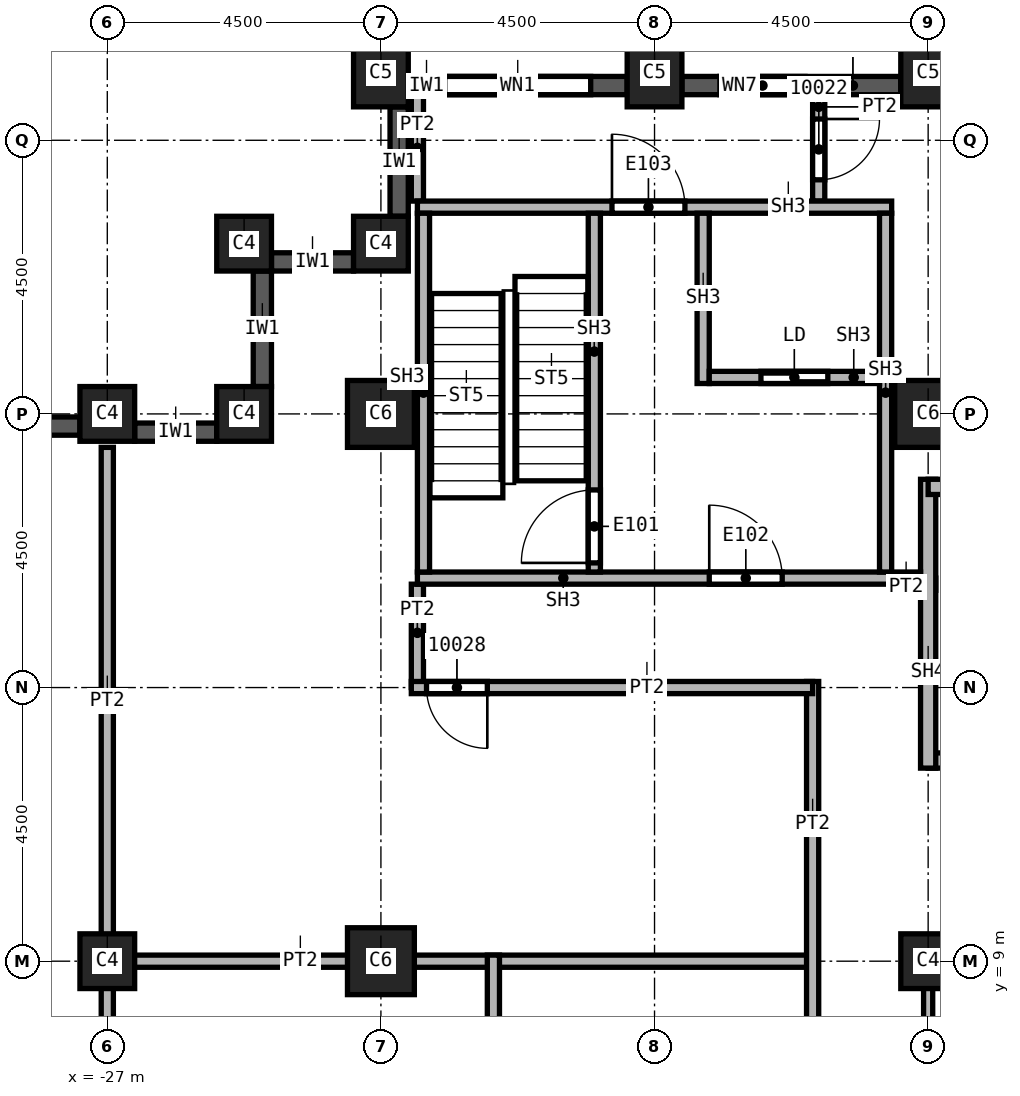
"""IFC4 building model, lengths in metres.
Left out: names, types, materials, properties, quantities, classifications, styles, units other than length and angle.
Written with IfcOpenShell. Run it as: python <this file> out.ifc"""

import sys

from ifc_helpers import new_model, si_unit, direction, frame, frame_2d, origin, origin_2d, place, context, subcontext, project, spatial, rectangle, extrude, element, fill, save


model = new_model("IFC4")
c1 = context("Model", 3, precision=1e-05, world=origin(), true_north=direction((0.0, 1.0)))
c2 = subcontext(c1, "Body", "Model", "MODEL_VIEW")
j1 = project(units=[si_unit("LENGTHUNIT", "METRE"), si_unit("PLANEANGLEUNIT", "RADIAN")], contexts=[c1])
p1 = place(None, origin())
s1 = spatial("IfcSite", under=j1, at=p1, CompositionType="ELEMENT")
p2 = place(p1, origin())
s2 = spatial("IfcBuilding", under=s1, at=p2, CompositionType="ELEMENT")
p3 = place(p2, frame((0.0, 0.0, 174.0)))
s3 = spatial("IfcBuildingStorey", under=s2, at=p3, CompositionType="ELEMENT", Elevation=174.0)
for number, where, z_axis, x_axis in (
    (1, (-13.5, 18.0, 0.0), (0.0, 0.0, 1.0), (1.0, 0.0, 0.0)),
    (2, (-22.5, 9.0, 0.0), (0.0, 0.0, 1.0), (1.0, 0.0, 0.0)),
    (3, (-22.5, 18.0, 0.0), (0.0, 0.0, 1.0), (1.0, 0.0, 0.0)),
):
    element("IfcColumn", number, at=place(p3, frame(where, z_axis=z_axis, x_axis=x_axis)), inside=s3, PredefinedType="COLUMN", context=c2, shape_type="SweptSolid", body=[
        extrude(rectangle(XDim=1.1, YDim=1.1, at=origin_2d()), origin(), (0.0, 0.0, 1.0), 3.59),
    ])
p4 = place(p3, frame((-13.5, 9.0, 0.0), z_axis=(0.0, 0.0, 1.0), x_axis=(1.0, 0.0, 0.0)))
e4 = element("IfcColumn", 4, at=p4, inside=s3, PredefinedType="COLUMN", context=c2, shape_type="SweptSolid", body=[
    extrude(rectangle(XDim=0.9, YDim=0.9, at=origin_2d()), origin(), (0.0, 0.0, 1.0), 3.59),
])
for number, where, z_axis, x_axis in (
    (5, (-13.5, 23.6, 0.0), (0.0, 0.0, 1.0), (1.0, 0.0, 0.0)),
    (6, (-18.0, 23.6, 0.0), (0.0, 0.0, 1.0), (1.0, 0.0, 0.0)),
    (7, (-22.5, 23.6, 0.0), (0.0, 0.0, 1.0), (1.0, 0.0, 0.0)),
):
    element("IfcColumn", number, at=place(p3, frame(where, z_axis=z_axis, x_axis=x_axis)), inside=s3, PredefinedType="COLUMN", context=c2, shape_type="SweptSolid", body=[
        extrude(rectangle(XDim=0.9, YDim=1.1, at=origin_2d()), origin(), (0.0, 0.0, 1.0), 3.59),
    ])
for number, where, z_axis, x_axis in (
    (8, (-27.0, 9.0, 0.0), (0.0, 0.0, 1.0), (1.0, 0.0, 0.0)),
    (9, (-27.0, 18.0, 0.0), (0.0, 0.0, 1.0), (1.0, 0.0, 0.0)),
    (10, (-22.5, 20.8, 0.0), (0.0, 0.0, 1.0), (1.0, 0.0, 0.0)),
    (11, (-24.75, 20.8, 0.0), (0.0, 0.0, 1.0), (1.0, 0.0, 0.0)),
    (12, (-24.75, 18.0, 0.0), (0.0, 0.0, 1.0), (1.0, 0.0, 0.0)),
):
    element("IfcColumn", number, at=place(p3, frame(where, z_axis=z_axis, x_axis=x_axis)), inside=s3, PredefinedType="COLUMN", context=c2, shape_type="SweptSolid", body=[
        extrude(rectangle(XDim=0.9, YDim=0.9, at=origin_2d()), origin(), (0.0, 0.0, 1.0), 3.59),
    ])
p5 = place(p3, frame((-22.2, 23.05, 0.0), z_axis=(0.0, 0.0, 1.0), x_axis=(0.0, -1.0, 0.0)))
e13 = element("IfcWall", 13, at=p5, inside=s3, PredefinedType="SOLIDWALL", context=c2, shape_type="SweptSolid", body=[
    extrude(rectangle(XDim=1.8, YDim=0.3, at=frame_2d((0.9, 0.0))), origin(), (0.0, 0.0, 1.0), 2.99),
])
p6 = place(p3, frame((-22.95, 20.5, 0.0), z_axis=(0.0, 0.0, 1.0), x_axis=(-1.0, 0.0, 0.0)))
e14 = element("IfcWall", 14, at=p6, inside=s3, PredefinedType="SOLIDWALL", context=c2, shape_type="SweptSolid", body=[
    extrude(rectangle(XDim=1.35, YDim=0.3, at=frame_2d((0.675, 0.0))), origin(), (0.0, 0.0, 1.0), 2.99),
])
p7 = place(p3, frame((-24.45, 20.35, 0.0), z_axis=(0.0, 0.0, 1.0), x_axis=(0.0, -1.0, 0.0)))
e15 = element("IfcWall", 15, at=p7, inside=s3, PredefinedType="SOLIDWALL", context=c2, shape_type="SweptSolid", body=[
    extrude(rectangle(XDim=1.9, YDim=0.3, at=frame_2d((0.95, 0.0))), origin(), (0.0, 0.0, 1.0), 2.99),
])
p8 = place(p3, frame((-25.2, 17.7, 0.0), z_axis=(0.0, 0.0, 1.0), x_axis=(-1.0, 0.0, 0.0)))
e16 = element("IfcWall", 16, at=p8, inside=s3, PredefinedType="SOLIDWALL", context=c2, shape_type="SweptSolid", body=[
    extrude(rectangle(XDim=1.35, YDim=0.3, at=frame_2d((0.675, 0.0))), origin(), (0.0, 0.0, 1.0), 2.99),
])
p9 = place(p3, frame((-27.45, 17.8, 0.0), z_axis=(0.0, 0.0, 1.0), x_axis=(-1.0, 0.0, 0.0)))
e17 = element("IfcWall", 17, at=p9, inside=s3, PredefinedType="SOLIDWALL", context=c2, shape_type="SweptSolid", body=[
    extrude(rectangle(XDim=3.6, YDim=0.3, at=frame_2d((1.8, 0.0))), origin(), (0.0, 0.0, 1.0), 2.99),
])
p10 = place(p9, frame((0.6, 0.0, 0.8)))
e18 = element("IfcOpeningElement", 18, at=p10, cuts=e17, PredefinedType="OPENING", context=c2, shape_type="SweptSolid", body=[
    extrude(rectangle(XDim=2.4, YDim=1.95, at=frame_2d((1.2, 0.975))), frame((0.0, 0.15, 0.0), z_axis=(0.0, -1.0, 0.0), x_axis=(1.0, 0.0, 0.0)), (0.0, 0.0, 1.0), 0.3),
])
p11 = place(p3, frame((-13.95, 23.4, 0.0), z_axis=(0.0, 0.0, 1.0), x_axis=(-1.0, 0.0, 0.0)))
e19 = element("IfcWall", 19, at=p11, inside=s3, PredefinedType="SOLIDWALL", context=c2, shape_type="SweptSolid", body=[
    extrude(rectangle(XDim=3.6, YDim=0.3, at=frame_2d((1.8, 0.0))), origin(), (0.0, 0.0, 1.0), 2.99),
])
p12 = place(p11, frame((1.575, 0.0, 0.8)))
e20 = element("IfcOpeningElement", 20, at=p12, cuts=e19, PredefinedType="OPENING", context=c2, shape_type="SweptSolid", body=[
    extrude(rectangle(XDim=1.4, YDim=1.95, at=frame_2d((0.7, 0.975))), frame((0.0, 0.15, 0.0), z_axis=(0.0, -1.0, 0.0), x_axis=(1.0, 0.0, 0.0)), (0.0, 0.0, 1.0), 0.3),
])
p13 = place(p3, frame((-18.45, 23.4, 0.0), z_axis=(0.0, 0.0, 1.0), x_axis=(-1.0, 0.0, 0.0)))
e21 = element("IfcWall", 21, at=p13, inside=s3, PredefinedType="SOLIDWALL", context=c2, shape_type="SweptSolid", body=[
    extrude(rectangle(XDim=3.6, YDim=0.3, at=frame_2d((1.8, 0.0))), origin(), (0.0, 0.0, 1.0), 2.99),
])
p14 = place(p13, frame((0.6, 0.0, 0.8)))
e22 = element("IfcOpeningElement", 22, at=p14, cuts=e21, PredefinedType="OPENING", context=c2, shape_type="SweptSolid", body=[
    extrude(rectangle(XDim=2.4, YDim=1.95, at=frame_2d((1.2, 0.975))), frame((0.0, 0.15, 0.0), z_axis=(0.0, -1.0, 0.0), x_axis=(1.0, 0.0, 0.0)), (0.0, 0.0, 1.0), 0.3),
])
p15 = place(p3, frame((-27.1, 9.0, 0.0), z_axis=(0.0, 0.0, 1.0), x_axis=(1.0, 0.0, 0.0)))
e23 = element("IfcWall", 23, at=p15, inside=s3, PredefinedType="PARTITIONING", context=c2, shape_type="SweptSolid", body=[
    extrude(rectangle(XDim=11.7, YDim=0.2, at=frame_2d((5.85, 0.0))), origin(), (0.0, 0.0, 1.0), 3.59),
])
p16 = place(p3, frame((-27.0, 3.75, 0.0), z_axis=(0.0, 0.0, 1.0), x_axis=(0.0, 1.0, 0.0)))
e24 = element("IfcWall", 24, at=p16, inside=s3, PredefinedType="PARTITIONING", context=c2, shape_type="SweptSolid", body=[
    extrude(rectangle(XDim=13.7, YDim=0.2, at=frame_2d((6.85, 0.0))), origin(), (0.0, 0.0, 1.0), 3.59),
])
p17 = place(p3, frame((-21.9, 13.5, 0.0), z_axis=(0.0, 0.0, 1.0), x_axis=(0.0, 1.0, 0.0)))
e25 = element("IfcWall", 25, at=p17, inside=s3, PredefinedType="PARTITIONING", context=c2, shape_type="SweptSolid", body=[
    extrude(rectangle(XDim=1.7, YDim=0.2, at=frame_2d((0.85, 0.0))), origin(), (0.0, 0.0, 1.0), 3.59),
])
p18 = place(p3, frame((-21.9, 21.5, 0.0), z_axis=(0.0, 0.0, 1.0), x_axis=(0.0, 1.0, 0.0)))
e26 = element("IfcWall", 26, at=p18, inside=s3, PredefinedType="PARTITIONING", context=c2, shape_type="SweptSolid", body=[
    extrude(rectangle(XDim=1.75, YDim=0.2, at=frame_2d((0.875, 0.0))), origin(), (0.0, 0.0, 1.0), 3.59),
])
p19 = place(p3, frame((-20.65, 3.75, 0.0), z_axis=(0.0, 0.0, 1.0), x_axis=(0.0, 1.0, 0.0)))
e27 = element("IfcWall", 27, at=p19, inside=s3, PredefinedType="PARTITIONING", context=c2, shape_type="SweptSolid", body=[
    extrude(rectangle(XDim=5.35, YDim=0.2, at=frame_2d((2.675, 0.0))), origin(), (0.0, 0.0, 1.0), 3.59),
])
p20 = place(p19, frame((0.25, 0.0, 0.0)))
e28 = element("IfcOpeningElement", 28, at=p20, cuts=e27, PredefinedType="OPENING", context=c2, shape_type="SweptSolid", body=[
    extrude(rectangle(XDim=1.0, YDim=2.1, at=frame_2d((0.5, 1.05))), frame((0.0, 0.1, 0.0), z_axis=(0.0, -1.0, 0.0), x_axis=(1.0, 0.0, 0.0)), (0.0, 0.0, 1.0), 0.2),
])
p21 = place(p3, frame((-15.4, 3.65, 0.0), z_axis=(0.0, 0.0, 1.0), x_axis=(0.0, 1.0, 0.0)))
e29 = element("IfcWall", 29, at=p21, inside=s3, PredefinedType="PARTITIONING", context=c2, shape_type="SweptSolid", body=[
    extrude(rectangle(XDim=9.95, YDim=0.2, at=frame_2d((4.975, 0.0))), origin(), (0.0, 0.0, 1.0), 3.59),
])
p22 = place(p21, frame((0.4, 0.0, 0.0)))
e30 = element("IfcOpeningElement", 30, at=p22, cuts=e29, PredefinedType="OPENING", context=c2, shape_type="SweptSolid", body=[
    extrude(rectangle(XDim=1.0, YDim=2.1, at=frame_2d((0.5, 1.05))), frame((0.0, 0.1, 0.0), z_axis=(0.0, -1.0, 0.0), x_axis=(1.0, 0.0, 0.0)), (0.0, 0.0, 1.0), 0.2),
])
p23 = place(p3, frame((-15.4, 13.5, 0.0), z_axis=(0.0, 0.0, 1.0), x_axis=(-1.0, 0.0, 0.0)))
e31 = element("IfcWall", 31, at=p23, inside=s3, PredefinedType="PARTITIONING", context=c2, shape_type="SweptSolid", body=[
    extrude(rectangle(XDim=6.6, YDim=0.2, at=frame_2d((3.3, 0.0))), origin(), (0.0, 0.0, 1.0), 3.59),
])
p24 = place(p23, frame((5.35, 0.0, 0.0)))
e32 = element("IfcOpeningElement", 32, at=p24, cuts=e31, PredefinedType="OPENING", context=c2, shape_type="SweptSolid", body=[
    extrude(rectangle(XDim=1.0, YDim=2.1, at=frame_2d((0.5, 1.05))), frame((0.0, 0.1, 0.0), z_axis=(0.0, -1.0, 0.0), x_axis=(1.0, 0.0, 0.0)), (0.0, 0.0, 1.0), 0.2),
])
p25 = place(p3, frame((-15.3, 23.25, 0.0), z_axis=(0.0, 0.0, 1.0), x_axis=(0.0, -1.0, 0.0)))
e33 = element("IfcWall", 33, at=p25, inside=s3, PredefinedType="PARTITIONING", context=c2, shape_type="SweptSolid", body=[
    extrude(rectangle(XDim=1.75, YDim=0.2, at=frame_2d((0.875, 0.0))), origin(), (0.0, 0.0, 1.0), 3.59),
])
p26 = place(p25, frame((0.4, 0.0, 0.0)))
e34 = element("IfcOpeningElement", 34, at=p26, cuts=e33, PredefinedType="OPENING", context=c2, shape_type="SweptSolid", body=[
    extrude(rectangle(XDim=1.0, YDim=2.1, at=frame_2d((0.5, 1.05))), frame((0.0, 0.1, 0.0), z_axis=(0.0, -1.0, 0.0), x_axis=(1.0, 0.0, 0.0)), (0.0, 0.0, 1.0), 0.2),
])
p27 = place(p3, frame((-14.1, 15.2, 0.0), z_axis=(0.0, 0.0, 1.0), x_axis=(1.0, 0.0, 0.0)))
e35 = element("IfcWall", 35, at=p27, inside=s3, PredefinedType="PARTITIONING", context=c2, shape_type="SweptSolid", body=[
    extrude(rectangle(XDim=0.725, YDim=0.2, at=frame_2d((0.363, 0.0))), origin(), (0.0, 0.0, 1.0), 3.59),
])
p28 = place(p3, frame((-13.5, 12.3, 0.0), z_axis=(0.0, 0.0, 1.0), x_axis=(1.0, 0.0, 0.0)))
e36 = element("IfcWall", 36, at=p28, inside=s3, PredefinedType="SOLIDWALL", context=c2, shape_type="SweptSolid", body=[
    extrude(rectangle(XDim=9.125, YDim=0.25, at=frame_2d((4.562, 0.0))), origin(), (0.0, 0.0, 1.0), 3.59),
])
p29 = place(p28, frame((0.6, 0.0, 0.0)))
e37 = element("IfcOpeningElement", 37, at=p29, cuts=e36, PredefinedType="OPENING", context=c2, shape_type="SweptSolid", body=[
    extrude(rectangle(XDim=1.2, YDim=2.1, at=frame_2d((0.6, 1.05))), frame((0.0, 0.125, 0.0), z_axis=(0.0, -1.0, 0.0), x_axis=(1.0, 0.0, 0.0)), (0.0, 0.0, 1.0), 0.25),
])
p30 = place(p3, frame((-13.5, 12.175, 0.0), z_axis=(0.0, 0.0, 1.0), x_axis=(0.0, 1.0, 0.0)))
e38 = element("IfcWall", 38, at=p30, inside=s3, PredefinedType="SOLIDWALL", context=c2, shape_type="SweptSolid", body=[
    extrude(rectangle(XDim=4.75, YDim=0.25, at=frame_2d((2.375, 0.0))), origin(), (0.0, 0.0, 1.0), 3.59),
])
p31 = place(p3, frame((-13.5, 16.8, 0.0), z_axis=(0.0, 0.0, 1.0), x_axis=(1.0, 0.0, 0.0)))
e39 = element("IfcWall", 39, at=p31, inside=s3, PredefinedType="SOLIDWALL", context=c2, shape_type="SweptSolid", body=[
    extrude(rectangle(XDim=9.125, YDim=0.25, at=frame_2d((4.562, 0.0))), origin(), (0.0, 0.0, 1.0), 3.59),
])
p32 = place(p3, frame((-13.5, 3.0, 0.0), z_axis=(0.0, 0.0, 1.0), x_axis=(0.0, 1.0, 0.0)))
e40 = element("IfcWall", 40, at=p32, inside=s3, PredefinedType="PARTITIONING", context=c2, shape_type="SweptSolid", body=[
    extrude(rectangle(XDim=6.075, YDim=0.15, at=frame_2d((3.038, 0.0))), origin(), (0.0, 0.0, 1.0), 2.828),
])
p33 = place(p3, frame((-13.5, 9.0, 0.0), z_axis=(0.0, 0.0, 1.0), x_axis=(1.0, 0.0, 0.0)))
e41 = element("IfcWall", 41, at=p33, inside=s3, PredefinedType="PARTITIONING", context=c2, shape_type="SweptSolid", body=[
    extrude(rectangle(XDim=3.0, YDim=0.15, at=frame_2d((1.5, 0.0))), origin(), (0.0, 0.0, 1.0), 2.828),
])
p34 = place(p3, frame((-21.9, 15.3, 0.0), z_axis=(0.0, 0.0, 1.0), x_axis=(1.0, 0.0, 0.0)))
e42 = element("IfcWall", 42, at=p34, inside=s3, PredefinedType="SOLIDWALL", context=c2, shape_type="SweptSolid", body=[
    extrude(rectangle(XDim=8.275, YDim=0.2, at=frame_2d((4.137, 0.0))), origin(), (0.0, 0.0, 1.0), 3.59),
])
p35 = place(p34, frame((4.8, 0.0, 0.0)))
e43 = element("IfcOpeningElement", 43, at=p35, cuts=e42, PredefinedType="OPENING", context=c2, shape_type="SweptSolid", body=[
    extrude(rectangle(XDim=1.2, YDim=2.1, at=frame_2d((0.6, 1.05))), frame((0.0, 0.1, 0.0), z_axis=(0.0, -1.0, 0.0), x_axis=(1.0, 0.0, 0.0)), (0.0, 0.0, 1.0), 0.2),
])
p36 = place(p3, frame((-21.9, 21.4, 0.0), z_axis=(0.0, 0.0, 1.0), x_axis=(1.0, 0.0, 0.0)))
e44 = element("IfcWall", 44, at=p36, inside=s3, PredefinedType="SOLIDWALL", context=c2, shape_type="SweptSolid", body=[
    extrude(rectangle(XDim=7.8, YDim=0.2, at=frame_2d((3.9, 0.0))), origin(), (0.0, 0.0, 1.0), 3.59),
])
p37 = place(p36, frame((3.2, 0.0, 0.0)))
e45 = element("IfcOpeningElement", 45, at=p37, cuts=e44, PredefinedType="OPENING", context=c2, shape_type="SweptSolid", body=[
    extrude(rectangle(XDim=1.2, YDim=2.1, at=frame_2d((0.6, 1.05))), frame((0.0, 0.1, 0.0), z_axis=(0.0, -1.0, 0.0), x_axis=(1.0, 0.0, 0.0)), (0.0, 0.0, 1.0), 0.2),
])
for number, where, z_axis, x_axis in (
    (46, (-21.8, 15.4, 0.0), (0.0, 0.0, 1.0), (0.0, 1.0, 0.0)),
    (47, (-14.2, 15.4, 0.0), (0.0, 0.0, 1.0), (0.0, 1.0, 0.0)),
):
    element("IfcWall", number, at=place(p3, frame(where, z_axis=z_axis, x_axis=x_axis)), inside=s3, PredefinedType="SOLIDWALL", context=c2, shape_type="SweptSolid", body=[
        extrude(rectangle(XDim=5.9, YDim=0.2, at=frame_2d((2.95, 0.0))), origin(), (0.0, 0.0, 1.0), 3.59),
    ])
p38 = place(p3, frame((-18.99, 15.4, 0.0), z_axis=(0.0, 0.0, 1.0), x_axis=(0.0, 1.0, 0.0)))
e48 = element("IfcWall", 48, at=p38, inside=s3, PredefinedType="SOLIDWALL", context=c2, shape_type="SweptSolid", body=[
    extrude(rectangle(XDim=5.9, YDim=0.2, at=frame_2d((2.95, 0.0))), origin(), (0.0, 0.0, 1.0), 3.59),
])
p39 = place(p38, frame((0.15, 0.0, 0.0)))
e49 = element("IfcOpeningElement", 49, at=p39, cuts=e48, PredefinedType="OPENING", context=c2, shape_type="SweptSolid", body=[
    extrude(rectangle(XDim=1.2, YDim=2.1, at=frame_2d((0.6, 1.05))), frame((0.0, 0.1, 0.0), z_axis=(0.0, -1.0, 0.0), x_axis=(1.0, 0.0, 0.0)), (0.0, 0.0, 1.0), 0.2),
])
p40 = place(p3, frame((-17.2, 18.5, 0.0), z_axis=(0.0, 0.0, 1.0), x_axis=(0.0, 1.0, 0.0)))
e50 = element("IfcWall", 50, at=p40, inside=s3, PredefinedType="SOLIDWALL", context=c2, shape_type="SweptSolid", body=[
    extrude(rectangle(XDim=2.8, YDim=0.2, at=frame_2d((1.4, 0.0))), origin(), (0.0, 0.0, 1.0), 3.59),
])
p41 = place(p3, frame((-17.1, 18.6, 0.0), z_axis=(0.0, 0.0, 1.0), x_axis=(1.0, 0.0, 0.0)))
e51 = element("IfcWall", 51, at=p41, inside=s3, PredefinedType="SOLIDWALL", context=c2, shape_type="SweptSolid", body=[
    extrude(rectangle(XDim=2.8, YDim=0.2, at=frame_2d((1.4, 0.0))), origin(), (0.0, 0.0, 1.0), 3.59),
])
p42 = place(p41, frame((0.85, 0.0, 0.0)))
e52 = element("IfcOpeningElement", 52, at=p42, cuts=e51, PredefinedType="OPENING", context=c2, shape_type="SweptSolid", body=[
    extrude(rectangle(XDim=1.1, YDim=2.1, at=frame_2d((0.55, 1.05))), frame((0.0, 0.1, 0.0), z_axis=(0.0, -1.0, 0.0), x_axis=(1.0, 0.0, 0.0)), (0.0, 0.0, 1.0), 0.2),
])
p43 = place(p14, origin())
e53 = element("IfcWindow", 53, at=p43, inside=s3, PartitioningType="SINGLE_PANEL", PredefinedType="WINDOW", context=c2, shape_type="SweptSolid", body=[
    extrude(rectangle(XDim=2.4, YDim=1.95, at=frame_2d((1.2, 0.975))), frame((0.0, 0.03, 0.0), z_axis=(0.0, -1.0, 0.0), x_axis=(1.0, 0.0, 0.0)), (0.0, 0.0, 1.0), 0.06),
])
fill(e22, e53)
p44 = place(p26, origin())
e54 = element("IfcDoor", 54, at=p44, inside=s3, OperationType="SINGLE_SWING_LEFT", PredefinedType="DOOR", context=c2, shape_type="SweptSolid", body=[
    extrude(rectangle(XDim=1.0, YDim=2.1, at=frame_2d((0.5, 1.05))), frame((0.0, 0.025, 0.0), z_axis=(0.0, -1.0, 0.0), x_axis=(1.0, 0.0, 0.0)), (0.0, 0.0, 1.0), 0.05),
])
fill(e34, e54)
p45 = place(p24, origin())
e55 = element("IfcDoor", 55, at=p45, inside=s3, OperationType="SINGLE_SWING_LEFT", PredefinedType="DOOR", context=c2, shape_type="SweptSolid", body=[
    extrude(rectangle(XDim=1.0, YDim=2.1, at=frame_2d((0.5, 1.05))), frame((0.0, 0.025, 0.0), z_axis=(0.0, -1.0, 0.0), x_axis=(1.0, 0.0, 0.0)), (0.0, 0.0, 1.0), 0.05),
])
fill(e32, e55)
p46 = place(p39, origin())
e56 = element("IfcDoor", 56, at=p46, inside=s3, OperationType="SINGLE_SWING_LEFT", PredefinedType="DOOR", context=c2, shape_type="SweptSolid", body=[
    extrude(rectangle(XDim=1.2, YDim=2.1, at=frame_2d((0.6, 1.05))), frame((0.0, 0.025, 0.0), z_axis=(0.0, -1.0, 0.0), x_axis=(1.0, 0.0, 0.0)), (0.0, 0.0, 1.0), 0.05),
])
fill(e49, e56)
p47 = place(p42, origin())
e57 = element("IfcDoor", 57, at=p47, inside=s3, OperationType="SLIDING_TO_LEFT", PredefinedType="DOOR", context=c2, shape_type="SweptSolid", body=[
    extrude(rectangle(XDim=1.1, YDim=2.1, at=frame_2d((0.55, 1.05))), frame((0.0, 0.025, 0.0), z_axis=(0.0, -1.0, 0.0), x_axis=(1.0, 0.0, 0.0)), (0.0, 0.0, 1.0), 0.05),
])
fill(e52, e57)
p48 = place(p35, origin())
e58 = element("IfcDoor", 58, at=p48, inside=s3, OperationType="SINGLE_SWING_RIGHT", PredefinedType="DOOR", context=c2, shape_type="SweptSolid", body=[
    extrude(rectangle(XDim=1.2, YDim=2.1, at=frame_2d((0.6, 1.05))), frame((0.0, 0.025, 0.0), z_axis=(0.0, -1.0, 0.0), x_axis=(1.0, 0.0, 0.0)), (0.0, 0.0, 1.0), 0.05),
])
fill(e43, e58)
p49 = place(p37, origin())
e59 = element("IfcDoor", 59, at=p49, inside=s3, OperationType="SINGLE_SWING_LEFT", PredefinedType="DOOR", context=c2, shape_type="SweptSolid", body=[
    extrude(rectangle(XDim=1.2, YDim=2.1, at=frame_2d((0.6, 1.05))), frame((0.0, 0.025, 0.0), z_axis=(0.0, -1.0, 0.0), x_axis=(1.0, 0.0, 0.0)), (0.0, 0.0, 1.0), 0.05),
])
fill(e45, e59)
p50 = place(p12, origin())
e60 = element("IfcWindow", 60, at=p50, inside=s3, PartitioningType="SINGLE_PANEL", PredefinedType="WINDOW", context=c2, shape_type="SweptSolid", body=[
    extrude(rectangle(XDim=1.4, YDim=1.95, at=frame_2d((0.7, 0.975))), frame((0.0, 0.03, 0.0), z_axis=(0.0, -1.0, 0.0), x_axis=(1.0, 0.0, 0.0)), (0.0, 0.0, 1.0), 0.06),
])
fill(e20, e60)
save(model, sys.argv[1])
